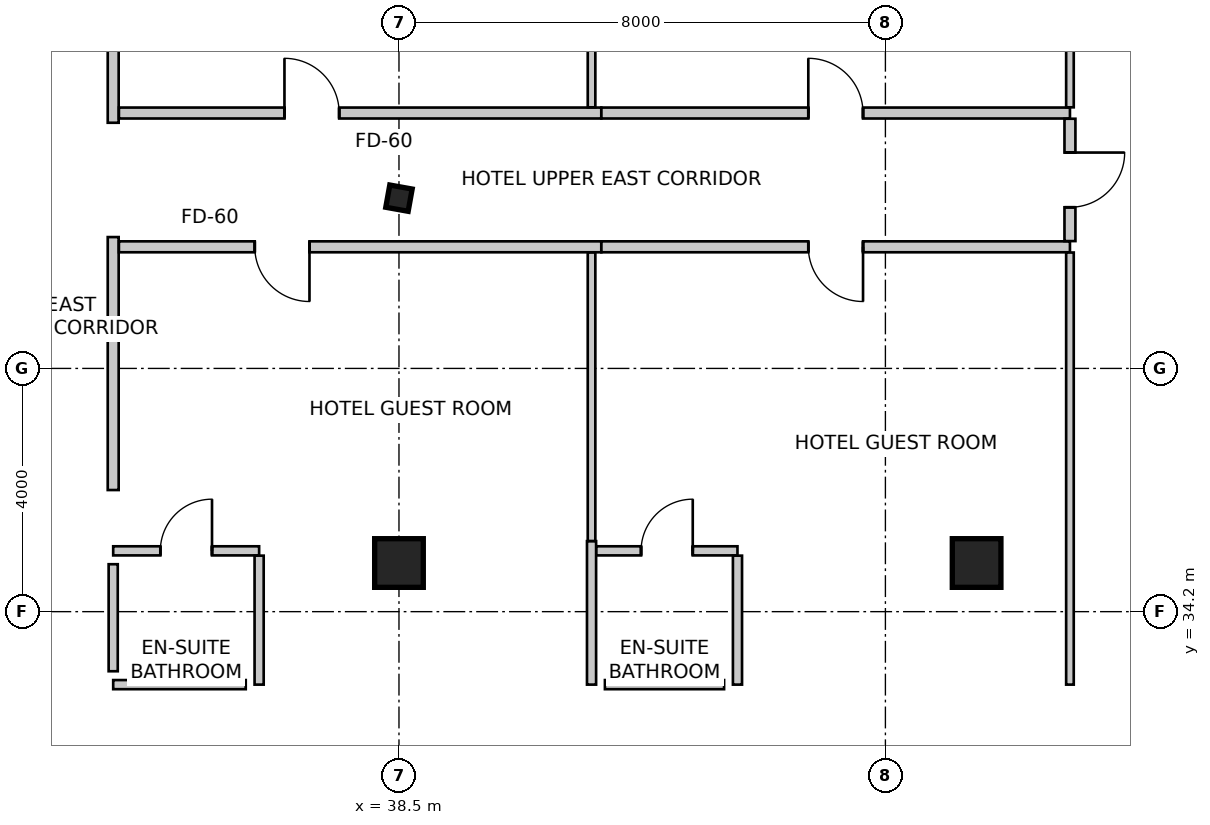
"""IFC4 building model, lengths in metres.
Left out: names, types, materials, properties, quantities, classifications, styles, units other than length and angle.
Written with IfcOpenShell. Run it as: python <this file> out.ifc"""

import sys

from ifc_helpers import new_model, si_unit, direction, frame, frame_2d, origin, origin_2d, place, context, subcontext, project, spatial, rectangle, i_section, extrude, source, transform, mapped, element, fill, save


model = new_model("IFC4")
c1 = context("Model", 3, precision=1e-05, world=origin(), true_north=direction((0.0, 1.0)))
c2 = subcontext(c1, "Body", "Model", "MODEL_VIEW")
j1 = project(units=[si_unit("LENGTHUNIT", "METRE"), si_unit("PLANEANGLEUNIT", "RADIAN")], contexts=[c1])
p1 = place(None, origin())
s1 = spatial("IfcSite", under=j1, at=p1, CompositionType="ELEMENT")
p2 = place(p1, origin())
s2 = spatial("IfcBuilding", under=s1, at=p2, CompositionType="ELEMENT")
p3 = place(p2, frame((0.0, 0.0, 161.0)))
s3 = spatial("IfcBuildingStorey", under=s2, at=p3, CompositionType="ELEMENT", Elevation=161.0)
m1 = source(origin(), c2, "Body", "SweptSolid", [
    extrude(rectangle(XDim=0.8, YDim=0.8, at=origin_2d()), origin(), (0.0, 0.0, 1.0), 3.6),
])
for number, where, z_axis, x_axis in (
    (1, (38.5, 35.0, 0.0), (0.0, 0.0, 1.0), (1.0, 0.0, 0.0)),
    (2, (48.0, 35.0, 0.0), (0.0, 0.0, 1.0), (1.0, 0.0, 0.0)),
):
    element("IfcColumn", number, at=place(p3, frame(where, z_axis=z_axis, x_axis=x_axis)), inside=s3, PredefinedType="COLUMN", context=c2, shape_type="MappedRepresentation", body=[
        mapped(m1, transform((0.0, 0.0, 0.0), scale=1.0)),
    ])
m2 = source(origin(), c2, "Body", "SweptSolid", [
    extrude(i_section(OverallWidth=0.374, OverallDepth=0.372, WebThickness=0.016, FlangeThickness=0.026, FilletRadius=0.015, at=origin_2d()), origin(), (0.0, 0.0, 1.0), 3.6),
])
p4 = place(p3, frame((38.5, 41.0, 0.0), z_axis=(0.0, 0.0, 1.0), x_axis=(0.984195607969, -0.17708474032, 0.0)))
e3 = element("IfcColumn", 3, at=p4, inside=s3, PredefinedType="COLUMN", context=c2, shape_type="MappedRepresentation", body=[
    mapped(m2, transform((0.0, 0.0, 0.0), scale=1.0)),
])
p5 = place(p3, frame((33.8, 46.256, 0.0), z_axis=(0.0, 0.0, 1.0), x_axis=(0.0, -1.0, 0.0)))
e4 = element("IfcWall", 4, at=p5, inside=s3, PredefinedType="PARTITIONING", context=c2, shape_type="SweptSolid", body=[
    extrude(rectangle(XDim=4.016, YDim=0.18, at=frame_2d((2.008, 0.0))), origin(), (0.0, 0.0, 1.0), 2.879),
])
p6 = place(p3, frame((33.8, 40.36, 0.0), z_axis=(0.0, 0.0, 1.0), x_axis=(0.0, -1.0, 0.0)))
e5 = element("IfcWall", 5, at=p6, inside=s3, PredefinedType="PARTITIONING", context=c2, shape_type="SweptSolid", body=[
    extrude(rectangle(XDim=4.16, YDim=0.18, at=frame_2d((2.08, 0.0))), origin(), (0.0, 0.0, 1.0), 3.35),
])
p7 = place(p3, frame((33.894, 42.4, 0.0), z_axis=(0.0, 0.0, 1.0), x_axis=(1.0, 0.0, 0.0)))
e6 = element("IfcWall", 6, at=p7, inside=s3, PredefinedType="PARTITIONING", context=c2, shape_type="SweptSolid", body=[
    extrude(rectangle(XDim=7.933, YDim=0.18, at=frame_2d((3.966, 0.0))), origin(), (0.0, 0.0, 1.0), 2.803),
])
m3 = source(origin(), c2, "Body", "SweptSolid", [
    extrude(rectangle(XDim=0.9, YDim=2.15, at=frame_2d((0.45, 1.075))), frame((0.0, 0.1, 0.0), z_axis=(0.0, -1.0, 0.0), x_axis=(1.0, 0.0, 0.0)), (0.0, 0.0, 1.0), 0.2),
])
p8 = place(p7, frame((2.723, 0.0, 0.0)))
e7 = element("IfcOpeningElement", 7, at=p8, cuts=e6, PredefinedType="OPENING", context=c2, shape_type="MappedRepresentation", body=[
    mapped(m3, transform((0.0, 0.0, 0.0), scale=1.0)),
])
p9 = place(p3, frame((41.827, 40.2, 0.0), z_axis=(0.0, 0.0, 1.0), x_axis=(-1.0, 0.0, 0.0)))
e8 = element("IfcWall", 8, at=p9, inside=s3, PredefinedType="PARTITIONING", context=c2, shape_type="SweptSolid", body=[
    extrude(rectangle(XDim=7.933, YDim=0.18, at=frame_2d((3.966, 0.0))), origin(), (0.0, 0.0, 1.0), 2.803),
])
p10 = place(p9, frame((4.799, 0.0, 0.0)))
e9 = element("IfcOpeningElement", 9, at=p10, cuts=e8, PredefinedType="OPENING", context=c2, shape_type="MappedRepresentation", body=[
    mapped(m3, transform((0.0, 0.0, 0.0), scale=1.0)),
])
p11 = place(p3, frame((41.829, 42.4, 0.0), z_axis=(0.0, 0.0, 1.0), x_axis=(1.0, 0.0, 0.0)))
e10 = element("IfcWall", 10, at=p11, inside=s3, PredefinedType="PARTITIONING", context=c2, shape_type="SweptSolid", body=[
    extrude(rectangle(XDim=7.706, YDim=0.18, at=frame_2d((3.853, 0.0))), origin(), (0.0, 0.0, 1.0), 2.803),
])
p12 = place(p11, frame((3.403, 0.0, 0.0)))
e11 = element("IfcOpeningElement", 11, at=p12, cuts=e10, PredefinedType="OPENING", context=c2, shape_type="MappedRepresentation", body=[
    mapped(m3, transform((0.0, 0.0, 0.0), scale=1.0)),
])
p13 = place(p3, frame((49.535, 40.2, 0.0), z_axis=(0.0, 0.0, 1.0), x_axis=(-1.0, 0.0, 0.0)))
e12 = element("IfcWall", 12, at=p13, inside=s3, PredefinedType="PARTITIONING", context=c2, shape_type="SweptSolid", body=[
    extrude(rectangle(XDim=7.706, YDim=0.18, at=frame_2d((3.853, 0.0))), origin(), (0.0, 0.0, 1.0), 2.803),
])
p14 = place(p13, frame((3.403, 0.0, 0.0)))
e13 = element("IfcOpeningElement", 13, at=p14, cuts=e12, PredefinedType="OPENING", context=c2, shape_type="MappedRepresentation", body=[
    mapped(m3, transform((0.0, 0.0, 0.0), scale=1.0)),
])
p15 = place(p3, frame((49.535, 42.306, 0.0), z_axis=(0.0, 0.0, 1.0), x_axis=(0.0, -1.0, 0.0)))
e14 = element("IfcWall", 14, at=p15, inside=s3, PredefinedType="PARTITIONING", context=c2, shape_type="SweptSolid", body=[
    extrude(rectangle(XDim=2.012, YDim=0.18, at=frame_2d((1.006, 0.0))), origin(), (0.0, 0.0, 1.0), 3.35),
])
p16 = place(p15, frame((0.556, 0.0, 0.0)))
e15 = element("IfcOpeningElement", 15, at=p16, cuts=e14, PredefinedType="OPENING", context=c2, shape_type="MappedRepresentation", body=[
    mapped(m3, transform((0.0, 0.0, 0.0), scale=1.0)),
])
p17 = place(p3, frame((41.667, 47.025, 0.0), z_axis=(0.0, 0.0, 1.0), x_axis=(0.0, -1.0, 0.0)))
e16 = element("IfcWall", 16, at=p17, inside=s3, PredefinedType="PARTITIONING", context=c2, shape_type="SweptSolid", body=[
    extrude(rectangle(XDim=4.531, YDim=0.125, at=frame_2d((2.265, 0.0))), origin(), (0.0, 0.0, 1.0), 2.492),
])
p18 = place(p3, frame((33.8, 35.2, 0.0), z_axis=(0.0, 0.0, 1.0), x_axis=(1.0, 0.0, 0.0)))
e17 = element("IfcWall", 17, at=p18, inside=s3, PredefinedType="PARTITIONING", context=c2, shape_type="SweptSolid", body=[
    extrude(rectangle(XDim=2.4, YDim=0.15, at=frame_2d((1.2, 0.0))), origin(), (0.0, 0.0, 1.0), 3.35),
])
m4 = source(origin(), c2, "Body", "SweptSolid", [
    extrude(rectangle(XDim=0.85, YDim=2.15, at=frame_2d((0.425, 1.075))), frame((0.0, 0.085, 0.0), z_axis=(0.0, -1.0, 0.0), x_axis=(1.0, 0.0, 0.0)), (0.0, 0.0, 1.0), 0.17),
])
p19 = place(p18, frame((0.775, 0.0, 0.0)))
e18 = element("IfcOpeningElement", 18, at=p19, cuts=e17, PredefinedType="OPENING", context=c2, shape_type="MappedRepresentation", body=[
    mapped(m4, transform((0.0, 0.0, 0.0), scale=1.0)),
])
p20 = place(p3, frame((36.2, 35.121, 0.0), z_axis=(0.0, 0.0, 1.0), x_axis=(0.0, -1.0, 0.0)))
e19 = element("IfcWall", 19, at=p20, inside=s3, PredefinedType="PARTITIONING", context=c2, shape_type="SweptSolid", body=[
    extrude(rectangle(XDim=2.121, YDim=0.15, at=frame_2d((1.061, 0.0))), origin(), (0.0, 0.0, 1.0), 3.35),
])
p21 = place(p3, frame((41.667, 35.36, 0.0), z_axis=(0.0, 0.0, 1.0), x_axis=(0.0, -1.0, 0.0)))
e20 = element("IfcWall", 20, at=p21, inside=s3, PredefinedType="PARTITIONING", context=c2, shape_type="SweptSolid", body=[
    extrude(rectangle(XDim=2.36, YDim=0.15, at=frame_2d((1.18, 0.0))), origin(), (0.0, 0.0, 1.0), 2.492),
])
p22 = place(p3, frame((41.667, 40.106, 0.0), z_axis=(0.0, 0.0, 1.0), x_axis=(0.0, -1.0, 0.0)))
e21 = element("IfcWall", 21, at=p22, inside=s3, PredefinedType="PARTITIONING", context=c2, shape_type="SweptSolid", body=[
    extrude(rectangle(XDim=4.744, YDim=0.125, at=frame_2d((2.372, 0.0))), origin(), (0.0, 0.0, 1.0), 2.879),
])
p23 = place(p3, frame((49.535, 48.049, 0.0), z_axis=(0.0, 0.0, 1.0), x_axis=(0.0, -1.0, 0.0)))
e22 = element("IfcWall", 22, at=p23, inside=s3, PredefinedType="PARTITIONING", context=c2, shape_type="SweptSolid", body=[
    extrude(rectangle(XDim=5.555, YDim=0.125, at=frame_2d((2.777, 0.0))), origin(), (0.0, 0.0, 1.0), 3.35),
])
p24 = place(p3, frame((41.746, 35.2, 0.0), z_axis=(0.0, 0.0, 1.0), x_axis=(1.0, 0.0, 0.0)))
e23 = element("IfcWall", 23, at=p24, inside=s3, PredefinedType="PARTITIONING", context=c2, shape_type="SweptSolid", body=[
    extrude(rectangle(XDim=2.321, YDim=0.15, at=frame_2d((1.16, 0.0))), origin(), (0.0, 0.0, 1.0), 2.492),
])
p25 = place(p24, frame((0.736, 0.0, 0.0)))
e24 = element("IfcOpeningElement", 24, at=p25, cuts=e23, PredefinedType="OPENING", context=c2, shape_type="MappedRepresentation", body=[
    mapped(m4, transform((0.0, 0.0, 0.0), scale=1.0)),
])
p26 = place(p3, frame((44.067, 35.121, 0.0), z_axis=(0.0, 0.0, 1.0), x_axis=(0.0, -1.0, 0.0)))
e25 = element("IfcWall", 25, at=p26, inside=s3, PredefinedType="PARTITIONING", context=c2, shape_type="SweptSolid", body=[
    extrude(rectangle(XDim=2.121, YDim=0.15, at=frame_2d((1.061, 0.0))), origin(), (0.0, 0.0, 1.0), 2.492),
])
p27 = place(p3, frame((49.535, 40.106, 0.0), z_axis=(0.0, 0.0, 1.0), x_axis=(0.0, -1.0, 0.0)))
e26 = element("IfcWall", 26, at=p27, inside=s3, PredefinedType="PARTITIONING", context=c2, shape_type="SweptSolid", body=[
    extrude(rectangle(XDim=7.106, YDim=0.125, at=frame_2d((3.553, 0.0))), origin(), (0.0, 0.0, 1.0), 3.35),
])
p28 = place(p3, frame((35.98, 33.0, 0.0), z_axis=(0.0, 0.0, 1.0), x_axis=(-1.0, 0.0, 0.0)))
e27 = element("IfcWall", 27, at=p28, inside=s3, PredefinedType="PARTITIONING", context=c2, shape_type="SweptSolid", body=[
    extrude(rectangle(XDim=2.18, YDim=0.15, at=frame_2d((1.09, 0.0))), origin(), (0.0, 0.0, 1.0), 3.35),
])
p29 = place(p3, frame((33.8, 33.22, 0.0), z_axis=(0.0, 0.0, 1.0), x_axis=(0.0, 1.0, 0.0)))
e28 = element("IfcWall", 28, at=p29, inside=s3, PredefinedType="PARTITIONING", context=c2, shape_type="SweptSolid", body=[
    extrude(rectangle(XDim=1.76, YDim=0.15, at=frame_2d((0.88, 0.0))), origin(), (0.0, 0.0, 1.0), 3.35),
])
p30 = place(p3, frame((43.847, 33.0, 0.0), z_axis=(0.0, 0.0, 1.0), x_axis=(-1.0, 0.0, 0.0)))
e29 = element("IfcWall", 29, at=p30, inside=s3, PredefinedType="PARTITIONING", context=c2, shape_type="SweptSolid", body=[
    extrude(rectangle(XDim=1.96, YDim=0.15, at=frame_2d((0.98, 0.0))), origin(), (0.0, 0.0, 1.0), 3.35),
])
m5 = source(origin(), c2, "Body", "SweptSolid", [
    extrude(rectangle(XDim=0.9, YDim=2.15, at=frame_2d((0.45, 1.075))), frame((0.0, 0.025, 0.0), z_axis=(0.0, -1.0, 0.0), x_axis=(1.0, 0.0, 0.0)), (0.0, 0.0, 1.0), 0.05),
])
p31 = place(p8, origin())
e30 = element("IfcDoor", 30, at=p31, inside=s3, OperationType="SINGLE_SWING_LEFT", PredefinedType="DOOR", context=c2, shape_type="MappedRepresentation", body=[
    mapped(m5, transform((0.0, 0.0, 0.0), scale=1.0)),
])
fill(e7, e30)
m6 = source(origin(), c2, "Body", "SweptSolid", [
    extrude(rectangle(XDim=0.85, YDim=2.15, at=frame_2d((0.425, 1.075))), frame((0.0, 0.025, 0.0), z_axis=(0.0, -1.0, 0.0), x_axis=(1.0, 0.0, 0.0)), (0.0, 0.0, 1.0), 0.05),
])
p32 = place(p19, origin())
e31 = element("IfcDoor", 31, at=p32, inside=s3, OperationType="SINGLE_SWING_RIGHT", PredefinedType="DOOR", context=c2, shape_type="MappedRepresentation", body=[
    mapped(m6, transform((0.0, 0.0, 0.0), scale=1.0)),
])
fill(e18, e31)
p33 = place(p10, origin())
e32 = element("IfcDoor", 32, at=p33, inside=s3, OperationType="SINGLE_SWING_LEFT", PredefinedType="DOOR", context=c2, shape_type="MappedRepresentation", body=[
    mapped(m5, transform((0.0, 0.0, 0.0), scale=1.0)),
])
fill(e9, e32)
p34 = place(p12, origin())
e33 = element("IfcDoor", 33, at=p34, inside=s3, OperationType="SINGLE_SWING_LEFT", PredefinedType="DOOR", context=c2, shape_type="MappedRepresentation", body=[
    mapped(m5, transform((0.0, 0.0, 0.0), scale=1.0)),
])
fill(e11, e33)
p35 = place(p25, origin())
e34 = element("IfcDoor", 34, at=p35, inside=s3, OperationType="SINGLE_SWING_RIGHT", PredefinedType="DOOR", context=c2, shape_type="MappedRepresentation", body=[
    mapped(m6, transform((0.0, 0.0, 0.0), scale=1.0)),
])
fill(e24, e34)
p36 = place(p14, origin())
e35 = element("IfcDoor", 35, at=p36, inside=s3, OperationType="SINGLE_SWING_LEFT", PredefinedType="DOOR", context=c2, shape_type="MappedRepresentation", body=[
    mapped(m5, transform((0.0, 0.0, 0.0), scale=1.0)),
])
fill(e13, e35)
p37 = place(p16, origin())
e36 = element("IfcDoor", 36, at=p37, inside=s3, OperationType="SINGLE_SWING_LEFT", PredefinedType="DOOR", context=c2, shape_type="MappedRepresentation", body=[
    mapped(m5, transform((0.0, 0.0, 0.0), scale=1.0)),
])
fill(e15, e36)
save(model, sys.argv[1])
